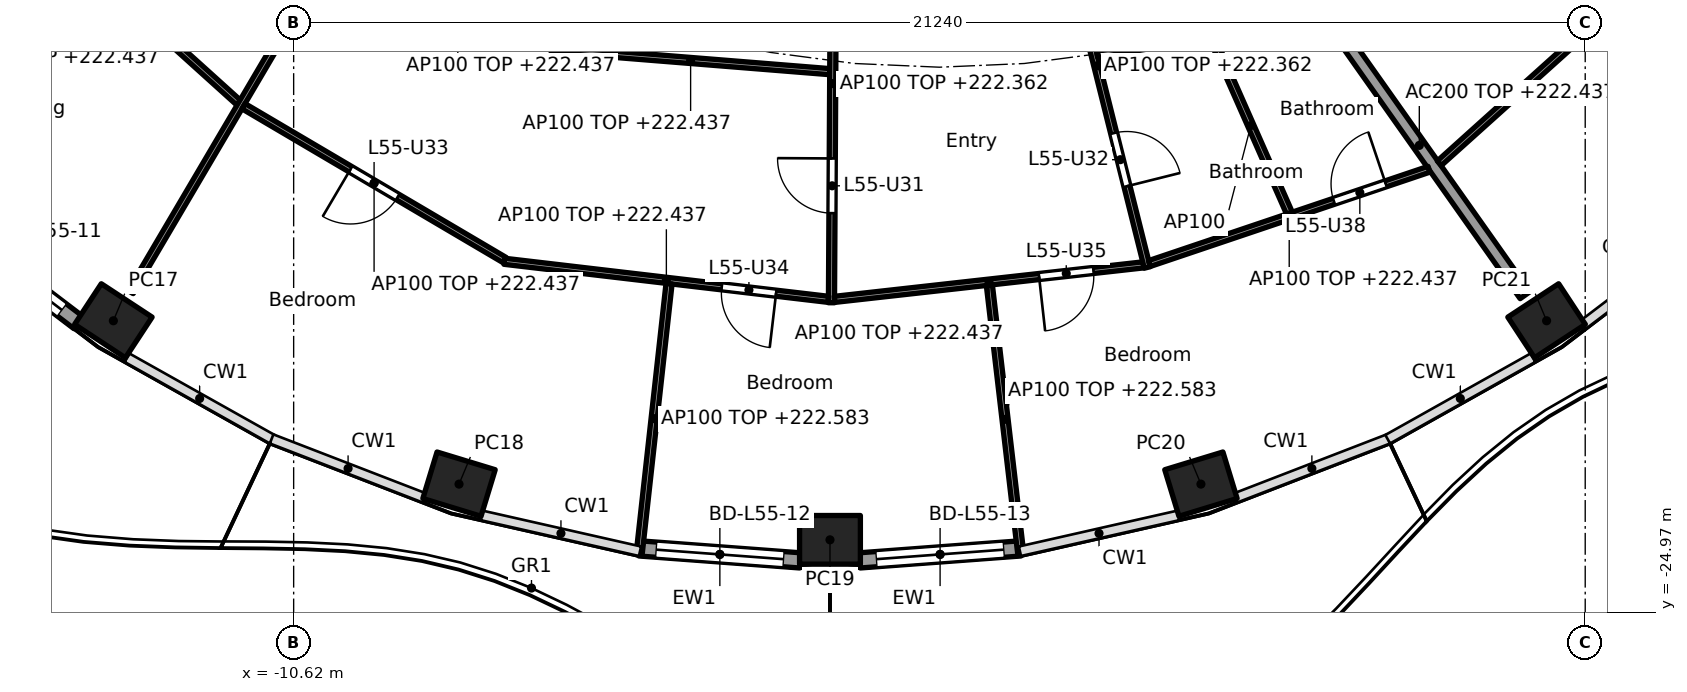
"""IFC4 building model, lengths in metres.
Left out: names, types, materials, properties, quantities, classifications, styles, units other than length and angle.
Written with IfcOpenShell. Run it as: python <this file> out.ifc"""

import sys

from ifc_helpers import new_model, si_unit, direction, frame, frame_2d, origin, origin_2d, place, context, subcontext, project, spatial, rectangle, hollow_rectangle, extrude, element, fill, save


model = new_model("IFC4")
c1 = context("Model", 3, precision=1e-05, world=origin(), true_north=direction((0.0, 1.0)))
c2 = subcontext(c1, "Body", "Model", "MODEL_VIEW")
j1 = project(units=[si_unit("LENGTHUNIT", "METRE"), si_unit("PLANEANGLEUNIT", "RADIAN")], contexts=[c1])
p1 = place(None, origin())
s1 = spatial("IfcSite", under=j1, at=p1, CompositionType="ELEMENT")
p2 = place(p1, origin())
s2 = spatial("IfcBuilding", under=s1, at=p2, CompositionType="ELEMENT")
p3 = place(p2, frame((0.0, 0.0, 219.6)))
s3 = spatial("IfcBuildingStorey", under=s2, at=p3, CompositionType="ELEMENT", Elevation=219.6)
for number, where, z_axis, x_axis in (
    (1, (-13.585, -20.17, 0.0), (0.0, 0.0, 1.0), (0.836, -0.549, 0.0)),
    (2, (-7.9, -22.856, 0.0), (0.0, 0.0, 1.0), (0.957, -0.292, 0.0)),
    (3, (-1.8, -23.772, 0.0), (0.0, 0.0, 1.0), (1.0, 0.0, 0.0)),
    (4, (4.3, -22.856, 0.0), (0.0, 0.0, 1.0), (0.957, 0.292, 0.0)),
    (5, (9.985, -20.17, 0.0), (0.0, 0.0, 1.0), (0.836, 0.549, 0.0)),
):
    element("IfcColumn", number, at=place(p3, frame(where, z_axis=z_axis, x_axis=x_axis)), inside=s3, PredefinedType="COLUMN", context=c2, shape_type="SweptSolid", body=[
        extrude(hollow_rectangle(XDim=1.0, YDim=0.8, WallThickness=0.032, at=origin_2d()), origin(), (0.0, 0.0, 1.0), 3.7),
    ])
p4 = place(p3, frame((-14.157, -20.201, 0.0), z_axis=(0.0, 0.0, 1.0), x_axis=(-0.795990084031, 0.60530966135, 0.0)))
e6 = element("IfcWall", 6, at=p4, inside=s3, PredefinedType="SOLIDWALL", context=c2, shape_type="SweptSolid", body=[
    extrude(rectangle(XDim=2.789, YDim=0.25, at=frame_2d((1.394, 0.0))), origin(), (0.0, 0.0, 1.0), 3.44),
])
p5 = place(p4, frame((0.344, 0.0, 0.0)))
e7 = element("IfcOpeningElement", 7, at=p5, cuts=e6, PredefinedType="OPENING", context=c2, shape_type="SweptSolid", body=[
    extrude(rectangle(XDim=2.1, YDim=2.4, at=frame_2d((1.05, 1.2))), frame((0.0, 0.135, 0.0), z_axis=(0.0, -1.0, 0.0), x_axis=(1.0, 0.0, 0.0)), (0.0, 0.0, 1.0), 0.27),
])
p6 = place(p3, frame((-2.289, -24.11, 0.0), z_axis=(0.0, 0.0, 1.0), x_axis=(-0.997233213085, 0.074336523458, 0.0)))
e8 = element("IfcWall", 8, at=p6, inside=s3, PredefinedType="SOLIDWALL", context=c2, shape_type="SweptSolid", body=[
    extrude(rectangle(XDim=2.65, YDim=0.25, at=frame_2d((1.325, 0.0))), origin(), (0.0, 0.0, 1.0), 3.44),
])
p7 = place(p6, frame((0.275, 0.0, 0.0)))
e9 = element("IfcOpeningElement", 9, at=p7, cuts=e8, PredefinedType="OPENING", context=c2, shape_type="SweptSolid", body=[
    extrude(rectangle(XDim=2.1, YDim=2.4, at=frame_2d((1.05, 1.2))), frame((0.0, 0.135, 0.0), z_axis=(0.0, -1.0, 0.0), x_axis=(1.0, 0.0, 0.0)), (0.0, 0.0, 1.0), 0.27),
])
p8 = place(p3, frame((1.333, -23.913, 0.0), z_axis=(0.0, 0.0, 1.0), x_axis=(-0.997233722033, -0.074329695546, 0.0)))
e10 = element("IfcWall", 10, at=p8, inside=s3, PredefinedType="SOLIDWALL", context=c2, shape_type="SweptSolid", body=[
    extrude(rectangle(XDim=2.651, YDim=0.25, at=frame_2d((1.325, 0.0))), origin(), (0.0, 0.0, 1.0), 3.44),
])
p9 = place(p8, frame((0.275, 0.0, 0.0)))
e11 = element("IfcOpeningElement", 11, at=p9, cuts=e10, PredefinedType="OPENING", context=c2, shape_type="SweptSolid", body=[
    extrude(rectangle(XDim=2.1, YDim=2.4, at=frame_2d((1.05, 1.2))), frame((0.0, 0.135, 0.0), z_axis=(0.0, -1.0, 0.0), x_axis=(1.0, 0.0, 0.0)), (0.0, 0.0, 1.0), 0.27),
])
p10 = place(p3, frame((6.152, -14.823, 0.0), z_axis=(0.0, 0.0, 1.0), x_axis=(0.576994695158, -0.816747893637, 0.0)))
e12 = element("IfcWall", 12, at=p10, inside=s3, PredefinedType="PARTITIONING", context=c2, shape_type="SweptSolid", body=[
    extrude(rectangle(XDim=6.03, YDim=0.2, at=frame_2d((3.015, 0.0))), origin(), (0.0, 0.0, 1.0), 2.837),
])
p11 = place(p3, frame((-15.474, -13.019, 0.0), z_axis=(0.0, 0.0, 1.0), x_axis=(0.742348572616, -0.670013878017, 0.0)))
e13 = element("IfcWall", 13, at=p11, inside=s3, PredefinedType="PARTITIONING", context=c2, shape_type="SweptSolid", body=[
    extrude(rectangle(XDim=5.319, YDim=0.1, at=frame_2d((2.66, 0.0))), origin(), (0.0, 0.0, 1.0), 2.837),
])
p12 = place(p3, frame((-7.709, -10.198, 0.0), z_axis=(0.0, 0.0, 1.0), x_axis=(-0.507355901053, -0.8617366127, 0.0)))
e14 = element("IfcWall", 14, at=p12, inside=s3, PredefinedType="PARTITIONING", context=c2, shape_type="SweptSolid", body=[
    extrude(rectangle(XDim=11.025, YDim=0.1, at=frame_2d((5.512, 0.0))), origin(), (0.0, 0.0, 1.0), 2.762),
])
p13 = place(p12, frame((5.05, 0.0, 0.0)))
e15 = element("IfcOpeningElement", 15, at=p13, cuts=e14, PredefinedType="OPENING", context=c2, shape_type="SweptSolid", body=[
    extrude(rectangle(XDim=0.9, YDim=2.1, at=frame_2d((0.45, 1.05))), frame((0.0, 0.06, 0.0), z_axis=(0.0, -1.0, 0.0), x_axis=(1.0, 0.0, 0.0)), (0.0, 0.0, 1.0), 0.12),
])
p14 = place(p3, frame((-11.445, -16.641, 0.0), z_axis=(0.0, 0.0, 1.0), x_axis=(0.861562560957, -0.507651409489, 0.0)))
e16 = element("IfcWall", 16, at=p14, inside=s3, PredefinedType="PARTITIONING", context=c2, shape_type="SweptSolid", body=[
    extrude(rectangle(XDim=4.985, YDim=0.1, at=frame_2d((2.492, 0.0))), origin(), (0.0, 0.0, 1.0), 2.837),
])
p15 = place(p14, frame((2.042, 0.0, 0.0)))
e17 = element("IfcOpeningElement", 17, at=p15, cuts=e16, PredefinedType="OPENING", context=c2, shape_type="SweptSolid", body=[
    extrude(rectangle(XDim=0.9, YDim=2.1, at=frame_2d((0.45, 1.05))), frame((0.0, 0.06, 0.0), z_axis=(0.0, -1.0, 0.0), x_axis=(1.0, 0.0, 0.0)), (0.0, 0.0, 1.0), 0.12),
])
p16 = place(p3, frame((-6.379, -15.705, 0.0), z_axis=(0.0, 0.0, 1.0), x_axis=(0.996786462227, -0.080104611105, 0.0)))
e18 = element("IfcWall", 18, at=p16, inside=s3, PredefinedType="PARTITIONING", context=c2, shape_type="SweptSolid", body=[
    extrude(rectangle(XDim=4.59, YDim=0.1, at=frame_2d((2.295, 0.0))), origin(), (0.0, 0.0, 1.0), 2.837),
])
p17 = place(p3, frame((-7.156, -19.191, 0.0), z_axis=(0.0, 0.0, 1.0), x_axis=(0.993172627718, -0.116653896424, 0.0)))
e19 = element("IfcWall", 19, at=p17, inside=s3, PredefinedType="PARTITIONING", context=c2, shape_type="SweptSolid", body=[
    extrude(rectangle(XDim=5.368, YDim=0.1, at=frame_2d((2.684, 0.0))), origin(), (0.0, 0.0, 1.0), 2.837),
])
p18 = place(p17, frame((3.601, 0.0, 0.0)))
e20 = element("IfcOpeningElement", 20, at=p18, cuts=e19, PredefinedType="OPENING", context=c2, shape_type="SweptSolid", body=[
    extrude(rectangle(XDim=0.9, YDim=2.1, at=frame_2d((0.45, 1.05))), frame((0.0, 0.06, 0.0), z_axis=(0.0, -1.0, 0.0), x_axis=(1.0, 0.0, 0.0)), (0.0, 0.0, 1.0), 0.12),
])
p19 = place(p3, frame((-4.447, -19.56, 0.0), z_axis=(0.0, 0.0, 1.0), x_axis=(-0.109897425445, -0.993942933915, 0.0)))
e21 = element("IfcWall", 21, at=p19, inside=s3, PredefinedType="PARTITIONING", context=c2, shape_type="SweptSolid", body=[
    extrude(rectangle(XDim=4.465, YDim=0.1, at=frame_2d((2.233, 0.0))), origin(), (0.0, 0.0, 1.0), 2.983),
])
p20 = place(p3, frame((-1.735, -12.665, 0.0), z_axis=(0.0, 0.0, 1.0), x_axis=(-0.005554152823, -0.999984575574, 0.0)))
e22 = element("IfcWall", 22, at=p20, inside=s3, PredefinedType="PARTITIONING", context=c2, shape_type="SweptSolid", body=[
    extrude(rectangle(XDim=7.209, YDim=0.1, at=frame_2d((3.604, 0.0))), origin(), (0.0, 0.0, 1.0), 2.762),
])
p21 = place(p20, frame((1.256, 0.0, 0.0)))
e23 = element("IfcOpeningElement", 23, at=p21, cuts=e22, PredefinedType="OPENING", context=c2, shape_type="SweptSolid", body=[
    extrude(rectangle(XDim=0.9, YDim=2.1, at=frame_2d((0.45, 1.05))), frame((0.0, 0.06, 0.0), z_axis=(0.0, -1.0, 0.0), x_axis=(1.0, 0.0, 0.0)), (0.0, 0.0, 1.0), 0.12),
])
p22 = place(p20, frame((4.836, 0.0, 0.0)))
e24 = element("IfcOpeningElement", 24, at=p22, cuts=e22, PredefinedType="OPENING", context=c2, shape_type="SweptSolid", body=[
    extrude(rectangle(XDim=0.9, YDim=2.1, at=frame_2d((0.45, 1.05))), frame((0.0, 0.06, 0.0), z_axis=(0.0, -1.0, 0.0), x_axis=(1.0, 0.0, 0.0)), (0.0, 0.0, 1.0), 0.12),
])
p23 = place(p3, frame((-1.726, -19.818, 0.0), z_axis=(0.0, 0.0, 1.0), x_axis=(0.99381893047, 0.111013212902, 0.0)))
e25 = element("IfcWall", 25, at=p23, inside=s3, PredefinedType="PARTITIONING", context=c2, shape_type="SweptSolid", body=[
    extrude(rectangle(XDim=5.113, YDim=0.1, at=frame_2d((2.557, 0.0))), origin(), (0.0, 0.0, 1.0), 2.837),
])
p24 = place(p23, frame((3.385, 0.0, 0.0)))
e26 = element("IfcOpeningElement", 26, at=p24, cuts=e25, PredefinedType="OPENING", context=c2, shape_type="SweptSolid", body=[
    extrude(rectangle(XDim=0.9, YDim=2.1, at=frame_2d((0.45, 1.05))), frame((0.0, 0.06, 0.0), z_axis=(0.0, -1.0, 0.0), x_axis=(1.0, 0.0, 0.0)), (0.0, 0.0, 1.0), 0.12),
])
p25 = place(p3, frame((0.821, -19.584, 0.0), z_axis=(0.0, 0.0, 1.0), x_axis=(0.116120946841, -0.993235080786, 0.0)))
e27 = element("IfcWall", 27, at=p25, inside=s3, PredefinedType="PARTITIONING", context=c2, shape_type="SweptSolid", body=[
    extrude(rectangle(XDim=4.445, YDim=0.1, at=frame_2d((2.222, 0.0))), origin(), (0.0, 0.0, 1.0), 2.983),
])
p26 = place(p3, frame((1.759, -12.662, 0.0), z_axis=(0.0, 0.0, 1.0), x_axis=(0.242653275363, -0.970113079984, 0.0)))
e28 = element("IfcWall", 28, at=p26, inside=s3, PredefinedType="PARTITIONING", context=c2, shape_type="SweptSolid", body=[
    extrude(rectangle(XDim=6.836, YDim=0.1, at=frame_2d((3.418, 0.0))), origin(), (0.0, 0.0, 1.0), 2.762),
])
p27 = place(p26, frame((1.166, 0.0, 0.0)))
e29 = element("IfcOpeningElement", 29, at=p27, cuts=e28, PredefinedType="OPENING", context=c2, shape_type="SweptSolid", body=[
    extrude(rectangle(XDim=0.9, YDim=2.1, at=frame_2d((0.45, 1.05))), frame((0.0, 0.06, 0.0), z_axis=(0.0, -1.0, 0.0), x_axis=(1.0, 0.0, 0.0)), (0.0, 0.0, 1.0), 0.12),
])
p28 = place(p26, frame((4.559, 0.0, 0.0)))
e30 = element("IfcOpeningElement", 30, at=p28, cuts=e28, PredefinedType="OPENING", context=c2, shape_type="SweptSolid", body=[
    extrude(rectangle(XDim=0.9, YDim=2.1, at=frame_2d((0.45, 1.05))), frame((0.0, 0.06, 0.0), z_axis=(0.0, -1.0, 0.0), x_axis=(1.0, 0.0, 0.0)), (0.0, 0.0, 1.0), 0.12),
])
p29 = place(p3, frame((2.593, -15.789, 0.0), z_axis=(0.0, 0.0, 1.0), x_axis=(0.986385117656, 0.164451815639, 0.0)))
e31 = element("IfcWall", 31, at=p29, inside=s3, PredefinedType="PARTITIONING", context=c2, shape_type="SweptSolid", body=[
    extrude(rectangle(XDim=3.747, YDim=0.1, at=frame_2d((1.874, 0.0))), origin(), (0.0, 0.0, 1.0), 2.837),
])
p30 = place(p3, frame((3.453, -19.229, 0.0), z_axis=(0.0, 0.0, 1.0), x_axis=(0.947565610716, 0.31956128268, 0.0)))
e32 = element("IfcWall", 32, at=p30, inside=s3, PredefinedType="PARTITIONING", context=c2, shape_type="SweptSolid", body=[
    extrude(rectangle(XDim=4.853, YDim=0.1, at=frame_2d((2.426, 0.0))), origin(), (0.0, 0.0, 1.0), 2.837),
])
p31 = place(p30, frame((3.202, 0.0, 0.0)))
e33 = element("IfcOpeningElement", 33, at=p31, cuts=e32, PredefinedType="OPENING", context=c2, shape_type="SweptSolid", body=[
    extrude(rectangle(XDim=0.9, YDim=2.1, at=frame_2d((0.45, 1.05))), frame((0.0, 0.06, 0.0), z_axis=(0.0, -1.0, 0.0), x_axis=(1.0, 0.0, 0.0)), (0.0, 0.0, 1.0), 0.12),
])
p32 = place(p3, frame((4.485, -15.522, 0.0), z_axis=(0.0, 0.0, 1.0), x_axis=(0.40391918208, -0.914794673327, 0.0)))
e34 = element("IfcWall", 34, at=p32, inside=s3, PredefinedType="PARTITIONING", context=c2, shape_type="SweptSolid", body=[
    extrude(rectangle(XDim=3.146, YDim=0.1, at=frame_2d((1.573, 0.0))), origin(), (0.0, 0.0, 1.0), 3.44),
])
p33 = place(p3, frame((8.22, -17.579, 0.0), z_axis=(0.0, 0.0, 1.0), x_axis=(0.743696370895, 0.668517544958, 0.0)))
e35 = element("IfcWall", 35, at=p33, inside=s3, PredefinedType="PARTITIONING", context=c2, shape_type="SweptSolid", body=[
    extrude(rectangle(XDim=6.125, YDim=0.1, at=frame_2d((3.062, 0.0))), origin(), (0.0, 0.0, 1.0), 2.837),
])
p34 = place(p5, origin())
e36 = element("IfcDoor", 36, at=p34, inside=s3, OperationType="SLIDING_TO_LEFT", PredefinedType="DOOR", context=c2, shape_type="SweptSolid", body=[
    extrude(rectangle(XDim=2.1, YDim=2.4, at=frame_2d((1.05, 1.2))), frame((0.0, 0.025, 0.0), z_axis=(0.0, -1.0, 0.0), x_axis=(1.0, 0.0, 0.0)), (0.0, 0.0, 1.0), 0.05),
])
fill(e7, e36)
p35 = place(p7, origin())
e37 = element("IfcDoor", 37, at=p35, inside=s3, OperationType="SLIDING_TO_LEFT", PredefinedType="DOOR", context=c2, shape_type="SweptSolid", body=[
    extrude(rectangle(XDim=2.1, YDim=2.4, at=frame_2d((1.05, 1.2))), frame((0.0, 0.025, 0.0), z_axis=(0.0, -1.0, 0.0), x_axis=(1.0, 0.0, 0.0)), (0.0, 0.0, 1.0), 0.05),
])
fill(e9, e37)
p36 = place(p9, origin())
e38 = element("IfcDoor", 38, at=p36, inside=s3, OperationType="SLIDING_TO_LEFT", PredefinedType="DOOR", context=c2, shape_type="SweptSolid", body=[
    extrude(rectangle(XDim=2.1, YDim=2.4, at=frame_2d((1.05, 1.2))), frame((0.0, 0.025, 0.0), z_axis=(0.0, -1.0, 0.0), x_axis=(1.0, 0.0, 0.0)), (0.0, 0.0, 1.0), 0.05),
])
fill(e11, e38)
p37 = place(p22, frame((0.9, 0.0, 0.0), x_axis=(-1.0, 0.0, 0.0)))
e39 = element("IfcDoor", 39, at=p37, inside=s3, OperationType="SINGLE_SWING_RIGHT", PredefinedType="DOOR", context=c2, shape_type="SweptSolid", body=[
    extrude(rectangle(XDim=0.9, YDim=2.1, at=frame_2d((0.45, 1.05))), frame((0.0, 0.025, 0.0), z_axis=(0.0, -1.0, 0.0), x_axis=(1.0, 0.0, 0.0)), (0.0, 0.0, 1.0), 0.05),
])
fill(e24, e39)
p38 = place(p28, origin())
e40 = element("IfcDoor", 40, at=p38, inside=s3, OperationType="SINGLE_SWING_RIGHT", PredefinedType="DOOR", context=c2, shape_type="SweptSolid", body=[
    extrude(rectangle(XDim=0.9, YDim=2.1, at=frame_2d((0.45, 1.05))), frame((0.0, 0.025, 0.0), z_axis=(0.0, -1.0, 0.0), x_axis=(1.0, 0.0, 0.0)), (0.0, 0.0, 1.0), 0.05),
])
fill(e30, e40)
p39 = place(p15, frame((0.9, 0.0, 0.0), x_axis=(-1.0, 0.0, 0.0)))
e41 = element("IfcDoor", 41, at=p39, inside=s3, OperationType="SINGLE_SWING_RIGHT", PredefinedType="DOOR", context=c2, shape_type="SweptSolid", body=[
    extrude(rectangle(XDim=0.9, YDim=2.1, at=frame_2d((0.45, 1.05))), frame((0.0, 0.025, 0.0), z_axis=(0.0, -1.0, 0.0), x_axis=(1.0, 0.0, 0.0)), (0.0, 0.0, 1.0), 0.05),
])
fill(e17, e41)
p40 = place(p18, frame((0.9, 0.0, 0.0), x_axis=(-1.0, 0.0, 0.0)))
e42 = element("IfcDoor", 42, at=p40, inside=s3, OperationType="SINGLE_SWING_LEFT", PredefinedType="DOOR", context=c2, shape_type="SweptSolid", body=[
    extrude(rectangle(XDim=0.9, YDim=2.1, at=frame_2d((0.45, 1.05))), frame((0.0, 0.025, 0.0), z_axis=(0.0, -1.0, 0.0), x_axis=(1.0, 0.0, 0.0)), (0.0, 0.0, 1.0), 0.05),
])
fill(e20, e42)
p41 = place(p24, frame((0.9, 0.0, 0.0), x_axis=(-1.0, 0.0, 0.0)))
e43 = element("IfcDoor", 43, at=p41, inside=s3, OperationType="SINGLE_SWING_RIGHT", PredefinedType="DOOR", context=c2, shape_type="SweptSolid", body=[
    extrude(rectangle(XDim=0.9, YDim=2.1, at=frame_2d((0.45, 1.05))), frame((0.0, 0.025, 0.0), z_axis=(0.0, -1.0, 0.0), x_axis=(1.0, 0.0, 0.0)), (0.0, 0.0, 1.0), 0.05),
])
fill(e26, e43)
p42 = place(p31, origin())
e44 = element("IfcDoor", 44, at=p42, inside=s3, OperationType="SINGLE_SWING_RIGHT", PredefinedType="DOOR", context=c2, shape_type="SweptSolid", body=[
    extrude(rectangle(XDim=0.9, YDim=2.1, at=frame_2d((0.45, 1.05))), frame((0.0, 0.025, 0.0), z_axis=(0.0, -1.0, 0.0), x_axis=(1.0, 0.0, 0.0)), (0.0, 0.0, 1.0), 0.05),
])
fill(e33, e44)
save(model, sys.argv[1])
